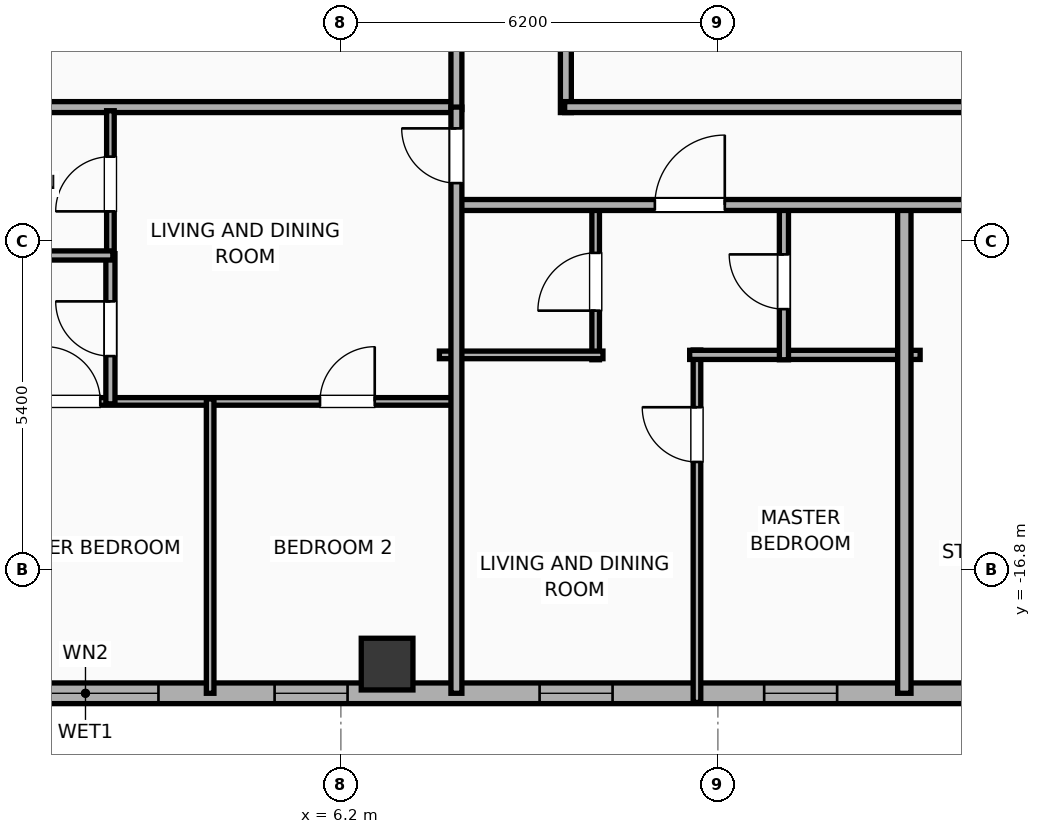
"""IFC4 building model, lengths in metres.
Left out: names, types, materials, properties, quantities, classifications, styles, units other than length and angle.
Written with IfcOpenShell. Run it as: python <this file> out.ifc"""

import sys

from ifc_helpers import new_model, si_unit, direction, frame, frame_2d, origin, origin_2d, place, context, subcontext, project, spatial, rectangle, hollow_rectangle, extrude, element, fill, save


model = new_model("IFC4")
c1 = context("Model", 3, precision=1e-05, world=origin(), true_north=direction((0.0, 1.0)))
c2 = subcontext(c1, "Body", "Model", "MODEL_VIEW")
j1 = project(units=[si_unit("LENGTHUNIT", "METRE"), si_unit("PLANEANGLEUNIT", "RADIAN")], contexts=[c1])
p1 = place(None, origin())
s1 = spatial("IfcSite", under=j1, at=p1, CompositionType="ELEMENT")
p2 = place(p1, origin())
s2 = spatial("IfcBuilding", under=s1, at=p2, CompositionType="ELEMENT")
p3 = place(p2, frame((0.0, 0.0, 219.7)))
s3 = spatial("IfcBuildingStorey", under=s2, at=p3, CompositionType="ELEMENT", Elevation=219.7)
p4 = place(p3, frame((6.96, -18.35, 0.0), z_axis=(0.0, 0.0, 1.0), x_axis=(1.0, 0.0, 0.0)))
e1 = element("IfcColumn", 1, at=p4, inside=s3, PredefinedType="COLUMN", context=c2, shape_type="SweptSolid", body=[
    extrude(hollow_rectangle(XDim=0.85, YDim=0.85, WallThickness=0.028, at=origin_2d()), origin(), (0.0, 0.0, 1.0), 3.9),
])
p5 = place(p3, frame((26.783, -18.83, 0.0), z_axis=(0.0, 0.0, 1.0), x_axis=(-1.0, 0.0, 0.0)))
e2 = element("IfcWall", 2, at=p5, inside=s3, PredefinedType="ELEMENTEDWALL", context=c2, shape_type="SweptSolid", body=[
    extrude(rectangle(XDim=49.566, YDim=0.34, at=frame_2d((24.783, 0.0))), origin(), (0.0, 0.0, 1.0), 3.65),
])
p6 = place(p5, frame((23.583, 0.0, 0.75)))
e3 = element("IfcOpeningElement", 3, at=p6, cuts=e2, PredefinedType="OPENING", context=c2, shape_type="SweptSolid", body=[
    extrude(rectangle(XDim=2.4, YDim=2.1, at=frame_2d((1.2, 1.05))), frame((0.0, 0.18, 0.0), z_axis=(0.0, -1.0, 0.0), x_axis=(1.0, 0.0, 0.0)), (0.0, 0.0, 1.0), 0.36),
])
p7 = place(p5, frame((41.756, 0.0, 0.75)))
e4 = element("IfcOpeningElement", 4, at=p7, cuts=e2, PredefinedType="OPENING", context=c2, shape_type="SweptSolid", body=[
    extrude(rectangle(XDim=2.4, YDim=2.1, at=frame_2d((1.2, 1.05))), frame((0.0, 0.18, 0.0), z_axis=(0.0, -1.0, 0.0), x_axis=(1.0, 0.0, 0.0)), (0.0, 0.0, 1.0), 0.36),
])
p8 = place(p5, frame((47.222, 0.0, 0.75)))
e5 = element("IfcOpeningElement", 5, at=p8, cuts=e2, PredefinedType="OPENING", context=c2, shape_type="SweptSolid", body=[
    extrude(rectangle(XDim=1.2, YDim=2.05, at=frame_2d((0.6, 1.025))), frame((0.0, 0.18, 0.0), z_axis=(0.0, -1.0, 0.0), x_axis=(1.0, 0.0, 0.0)), (0.0, 0.0, 1.0), 0.36),
])
p9 = place(p5, frame((45.08, 0.0, 0.75)))
e6 = element("IfcOpeningElement", 6, at=p9, cuts=e2, PredefinedType="OPENING", context=c2, shape_type="SweptSolid", body=[
    extrude(rectangle(XDim=1.2, YDim=2.05, at=frame_2d((0.6, 1.025))), frame((0.0, 0.18, 0.0), z_axis=(0.0, -1.0, 0.0), x_axis=(1.0, 0.0, 0.0)), (0.0, 0.0, 1.0), 0.36),
])
p10 = place(p5, frame((37.289, 0.0, 0.75)))
e7 = element("IfcOpeningElement", 7, at=p10, cuts=e2, PredefinedType="OPENING", context=c2, shape_type="SweptSolid", body=[
    extrude(rectangle(XDim=1.2, YDim=2.05, at=frame_2d((0.6, 1.025))), frame((0.0, 0.18, 0.0), z_axis=(0.0, -1.0, 0.0), x_axis=(1.0, 0.0, 0.0)), (0.0, 0.0, 1.0), 0.36),
])
p11 = place(p5, frame((16.115, 0.0, 0.75)))
e8 = element("IfcOpeningElement", 8, at=p11, cuts=e2, PredefinedType="OPENING", context=c2, shape_type="SweptSolid", body=[
    extrude(rectangle(XDim=1.2, YDim=2.05, at=frame_2d((0.6, 1.025))), frame((0.0, 0.18, 0.0), z_axis=(0.0, -1.0, 0.0), x_axis=(1.0, 0.0, 0.0)), (0.0, 0.0, 1.0), 0.36),
])
p12 = place(p5, frame((12.422, 0.0, 0.75)))
e9 = element("IfcOpeningElement", 9, at=p12, cuts=e2, PredefinedType="OPENING", context=c2, shape_type="SweptSolid", body=[
    extrude(rectangle(XDim=1.2, YDim=2.05, at=frame_2d((0.6, 1.025))), frame((0.0, 0.18, 0.0), z_axis=(0.0, -1.0, 0.0), x_axis=(1.0, 0.0, 0.0)), (0.0, 0.0, 1.0), 0.36),
])
p13 = place(p5, frame((8.09, 0.0, 0.75)))
e10 = element("IfcOpeningElement", 10, at=p13, cuts=e2, PredefinedType="OPENING", context=c2, shape_type="SweptSolid", body=[
    extrude(rectangle(XDim=1.2, YDim=2.05, at=frame_2d((0.6, 1.025))), frame((0.0, 0.18, 0.0), z_axis=(0.0, -1.0, 0.0), x_axis=(1.0, 0.0, 0.0)), (0.0, 0.0, 1.0), 0.36),
])
p14 = place(p5, frame((4.637, 0.0, 0.75)))
e11 = element("IfcOpeningElement", 11, at=p14, cuts=e2, PredefinedType="OPENING", context=c2, shape_type="SweptSolid", body=[
    extrude(rectangle(XDim=1.2, YDim=2.05, at=frame_2d((0.6, 1.025))), frame((0.0, 0.18, 0.0), z_axis=(0.0, -1.0, 0.0), x_axis=(1.0, 0.0, 0.0)), (0.0, 0.0, 1.0), 0.36),
])
p15 = place(p5, frame((1.811, 0.0, 0.75)))
e12 = element("IfcOpeningElement", 12, at=p15, cuts=e2, PredefinedType="OPENING", context=c2, shape_type="SweptSolid", body=[
    extrude(rectangle(XDim=1.2, YDim=2.05, at=frame_2d((0.6, 1.025))), frame((0.0, 0.18, 0.0), z_axis=(0.0, -1.0, 0.0), x_axis=(1.0, 0.0, 0.0)), (0.0, 0.0, 1.0), 0.36),
])
p16 = place(p5, frame((32.253, 0.0, 0.75)))
e13 = element("IfcOpeningElement", 13, at=p16, cuts=e2, PredefinedType="OPENING", context=c2, shape_type="SweptSolid", body=[
    extrude(rectangle(XDim=1.2, YDim=2.05, at=frame_2d((0.6, 1.025))), frame((0.0, 0.18, 0.0), z_axis=(0.0, -1.0, 0.0), x_axis=(1.0, 0.0, 0.0)), (0.0, 0.0, 1.0), 0.36),
])
p17 = place(p5, frame((27.853, 0.0, 0.75)))
e14 = element("IfcOpeningElement", 14, at=p17, cuts=e2, PredefinedType="OPENING", context=c2, shape_type="SweptSolid", body=[
    extrude(rectangle(XDim=1.2, YDim=2.05, at=frame_2d((0.6, 1.025))), frame((0.0, 0.18, 0.0), z_axis=(0.0, -1.0, 0.0), x_axis=(1.0, 0.0, 0.0)), (0.0, 0.0, 1.0), 0.36),
])
p18 = place(p5, frame((20.473, 0.0, 0.75)))
e15 = element("IfcOpeningElement", 15, at=p18, cuts=e2, PredefinedType="OPENING", context=c2, shape_type="SweptSolid", body=[
    extrude(rectangle(XDim=1.2, YDim=2.05, at=frame_2d((0.6, 1.025))), frame((0.0, 0.18, 0.0), z_axis=(0.0, -1.0, 0.0), x_axis=(1.0, 0.0, 0.0)), (0.0, 0.0, 1.0), 0.36),
])
p19 = place(p3, frame((9.9, -9.28, 0.0), z_axis=(0.0, 0.0, 1.0), x_axis=(0.0, 1.0, 0.0)))
e16 = element("IfcWall", 16, at=p19, inside=s3, PredefinedType="PARTITIONING", context=c2, shape_type="SweptSolid", body=[
    extrude(rectangle(XDim=18.56, YDim=0.18, at=frame_2d((9.28, 0.0))), origin(), (0.0, 0.0, 1.0), 3.65),
])
p20 = place(p19, frame((7.802, 0.0, 0.0)))
e17 = element("IfcOpeningElement", 17, at=p20, cuts=e16, PredefinedType="OPENING", context=c2, shape_type="SweptSolid", body=[
    extrude(rectangle(XDim=1.1, YDim=2.05, at=frame_2d((0.55, 1.025))), frame((0.0, 0.1, 0.0), z_axis=(0.0, -1.0, 0.0), x_axis=(1.0, 0.0, 0.0)), (0.0, 0.0, 1.0), 0.2),
])
p21 = place(p3, frame((9.88, -9.19, 0.0), z_axis=(0.0, 0.0, 1.0), x_axis=(1.0, 0.0, 0.0)))
e18 = element("IfcWall", 18, at=p21, inside=s3, PredefinedType="PARTITIONING", context=c2, shape_type="SweptSolid", body=[
    extrude(rectangle(XDim=20.35, YDim=0.18, at=frame_2d((10.175, 0.0))), origin(), (0.0, 0.0, 1.0), 3.65),
])
p22 = place(p3, frame((-8.15, -9.19, 0.0), z_axis=(0.0, 0.0, 1.0), x_axis=(1.0, 0.0, 0.0)))
e19 = element("IfcWall", 19, at=p22, inside=s3, PredefinedType="PARTITIONING", context=c2, shape_type="SweptSolid", body=[
    extrude(rectangle(XDim=16.3, YDim=0.18, at=frame_2d((8.15, 0.0))), origin(), (0.0, 0.0, 1.0), 3.65),
])
p23 = place(p3, frame((8.1, -9.23, 0.0), z_axis=(0.0, 0.0, 1.0), x_axis=(0.0, 1.0, 0.0)))
e20 = element("IfcWall", 20, at=p23, inside=s3, PredefinedType="PARTITIONING", context=c2, shape_type="SweptSolid", body=[
    extrude(rectangle(XDim=18.46, YDim=0.18, at=frame_2d((9.23, 0.0))), origin(), (0.0, 0.0, 1.0), 3.65),
])
p24 = place(p3, frame((12.056, -18.98, 0.0), z_axis=(0.0, 0.0, 1.0), x_axis=(0.0, 1.0, 0.0)))
e21 = element("IfcWall", 21, at=p24, inside=s3, PredefinedType="PARTITIONING", context=c2, shape_type="SweptSolid", body=[
    extrude(rectangle(XDim=5.795, YDim=0.125, at=frame_2d((2.897, 0.0))), origin(), (0.0, 0.0, 1.0), 3.65),
])
p25 = place(p24, frame((3.954, 0.0, 0.0)))
e22 = element("IfcOpeningElement", 22, at=p25, cuts=e21, PredefinedType="OPENING", context=c2, shape_type="SweptSolid", body=[
    extrude(rectangle(XDim=0.9, YDim=2.05, at=frame_2d((0.45, 1.025))), frame((0.0, 0.073, 0.0), z_axis=(0.0, -1.0, 0.0), x_axis=(1.0, 0.0, 0.0)), (0.0, 0.0, 1.0), 0.145),
])
p26 = place(p3, frame((11.936, -13.265, 0.0), z_axis=(0.0, 0.0, 1.0), x_axis=(1.0, 0.0, 0.0)))
e23 = element("IfcWall", 23, at=p26, inside=s3, PredefinedType="PLUMBINGWALL", context=c2, shape_type="SweptSolid", body=[
    extrude(rectangle(XDim=3.79, YDim=0.15, at=frame_2d((1.895, 0.0))), origin(), (0.0, 0.0, 1.0), 3.65),
])
p27 = place(p3, frame((10.39, -13.345, 0.0), z_axis=(0.0, 0.0, 1.0), x_axis=(0.0, 1.0, 0.0)))
e24 = element("IfcWall", 24, at=p27, inside=s3, PredefinedType="PARTITIONING", context=c2, shape_type="SweptSolid", body=[
    extrude(rectangle(XDim=2.565, YDim=0.125, at=frame_2d((1.282, 0.0))), origin(), (0.0, 0.0, 1.0), 3.65),
])
p28 = place(p27, frame((0.808, 0.0, 0.0)))
e25 = element("IfcOpeningElement", 25, at=p28, cuts=e24, PredefinedType="OPENING", context=c2, shape_type="SweptSolid", body=[
    extrude(rectangle(XDim=0.95, YDim=2.05, at=frame_2d((0.475, 1.025))), frame((0.0, 0.073, 0.0), z_axis=(0.0, -1.0, 0.0), x_axis=(1.0, 0.0, 0.0)), (0.0, 0.0, 1.0), 0.145),
])
p29 = place(p3, frame((7.82, -13.265, 0.0), z_axis=(0.0, 0.0, 1.0), x_axis=(1.0, 0.0, 0.0)))
e26 = element("IfcWall", 26, at=p29, inside=s3, PredefinedType="PARTITIONING", context=c2, shape_type="SweptSolid", body=[
    extrude(rectangle(XDim=2.69, YDim=0.125, at=frame_2d((1.345, 0.0))), origin(), (0.0, 0.0, 1.0), 3.65),
])
p30 = place(p3, frame((13.486, -13.345, 0.0), z_axis=(0.0, 0.0, 1.0), x_axis=(0.0, 1.0, 0.0)))
e27 = element("IfcWall", 27, at=p30, inside=s3, PredefinedType="PLUMBINGWALL", context=c2, shape_type="SweptSolid", body=[
    extrude(rectangle(XDim=2.565, YDim=0.15, at=frame_2d((1.282, 0.0))), origin(), (0.0, 0.0, 1.0), 3.65),
])
p31 = place(p30, frame((0.833, 0.0, 0.0)))
e28 = element("IfcOpeningElement", 28, at=p31, cuts=e27, PredefinedType="OPENING", context=c2, shape_type="SweptSolid", body=[
    extrude(rectangle(XDim=0.9, YDim=2.05, at=frame_2d((0.45, 1.025))), frame((0.0, 0.085, 0.0), z_axis=(0.0, -1.0, 0.0), x_axis=(1.0, 0.0, 0.0)), (0.0, 0.0, 1.0), 0.17),
])
p32 = place(p3, frame((15.466, -18.83, 0.0), z_axis=(0.0, 0.0, 1.0), x_axis=(0.0, 1.0, 0.0)))
e29 = element("IfcWall", 29, at=p32, inside=s3, PredefinedType="PARTITIONING", context=c2, shape_type="SweptSolid", body=[
    extrude(rectangle(XDim=8.11, YDim=0.22, at=frame_2d((4.055, 0.0))), origin(), (0.0, 0.0, 1.0), 3.65),
])
p33 = place(p3, frame((8.08, -10.8, 0.0), z_axis=(0.0, 0.0, 1.0), x_axis=(1.0, 0.0, 0.0)))
e30 = element("IfcWall", 30, at=p33, inside=s3, PredefinedType="PARTITIONING", context=c2, shape_type="SweptSolid", body=[
    extrude(rectangle(XDim=22.15, YDim=0.18, at=frame_2d((11.075, 0.0))), origin(), (0.0, 0.0, 1.0), 3.65),
])
p34 = place(p33, frame((3.283, 0.0, 0.0)))
e31 = element("IfcOpeningElement", 31, at=p34, cuts=e30, PredefinedType="OPENING", context=c2, shape_type="SweptSolid", body=[
    extrude(rectangle(XDim=1.15, YDim=2.05, at=frame_2d((0.575, 1.025))), frame((0.0, 0.1, 0.0), z_axis=(0.0, -1.0, 0.0), x_axis=(1.0, 0.0, 0.0)), (0.0, 0.0, 1.0), 0.2),
])
p35 = place(p33, frame((9.229, 0.0, 0.0)))
e32 = element("IfcOpeningElement", 32, at=p35, cuts=e30, PredefinedType="OPENING", context=c2, shape_type="SweptSolid", body=[
    extrude(rectangle(XDim=1.15, YDim=2.05, at=frame_2d((0.575, 1.025))), frame((0.0, 0.1, 0.0), z_axis=(0.0, -1.0, 0.0), x_axis=(1.0, 0.0, 0.0)), (0.0, 0.0, 1.0), 0.2),
])
p36 = place(p33, frame((18.084, 0.0, 0.0)))
e33 = element("IfcOpeningElement", 33, at=p36, cuts=e30, PredefinedType="OPENING", context=c2, shape_type="SweptSolid", body=[
    extrude(rectangle(XDim=1.15, YDim=2.05, at=frame_2d((0.575, 1.025))), frame((0.0, 0.1, 0.0), z_axis=(0.0, -1.0, 0.0), x_axis=(1.0, 0.0, 0.0)), (0.0, 0.0, 1.0), 0.2),
])
p37 = place(p3, frame((0.02, -14.03, 0.0), z_axis=(0.0, 0.0, 1.0), x_axis=(1.0, 0.0, 0.0)))
e34 = element("IfcWall", 34, at=p37, inside=s3, PredefinedType="PARTITIONING", context=c2, shape_type="SweptSolid", body=[
    extrude(rectangle(XDim=8.06, YDim=0.125, at=frame_2d((4.03, 0.0))), origin(), (0.0, 0.0, 1.0), 3.65),
])
p38 = place(p37, frame((1.323, 0.0, 0.0)))
e35 = element("IfcOpeningElement", 35, at=p38, cuts=e34, PredefinedType="OPENING", context=c2, shape_type="SweptSolid", body=[
    extrude(rectangle(XDim=0.9, YDim=2.05, at=frame_2d((0.45, 1.025))), frame((0.0, 0.073, 0.0), z_axis=(0.0, -1.0, 0.0), x_axis=(1.0, 0.0, 0.0)), (0.0, 0.0, 1.0), 0.145),
])
p39 = place(p37, frame((5.837, 0.0, 0.0)))
e36 = element("IfcOpeningElement", 36, at=p39, cuts=e34, PredefinedType="OPENING", context=c2, shape_type="SweptSolid", body=[
    extrude(rectangle(XDim=0.9, YDim=2.05, at=frame_2d((0.45, 1.025))), frame((0.0, 0.073, 0.0), z_axis=(0.0, -1.0, 0.0), x_axis=(1.0, 0.0, 0.0)), (0.0, 0.0, 1.0), 0.145),
])
p40 = place(p3, frame((2.41, -11.66, 0.0), z_axis=(0.0, 0.0, 1.0), x_axis=(0.0, 1.0, 0.0)))
e37 = element("IfcWall", 37, at=p40, inside=s3, PredefinedType="PARTITIONING", context=c2, shape_type="SweptSolid", body=[
    extrude(rectangle(XDim=2.41, YDim=0.125, at=frame_2d((1.205, 0.0))), origin(), (0.0, 0.0, 1.0), 3.65),
])
p41 = place(p40, frame((0.755, 0.0, 0.0)))
e38 = element("IfcOpeningElement", 38, at=p41, cuts=e37, PredefinedType="OPENING", context=c2, shape_type="SweptSolid", body=[
    extrude(rectangle(XDim=0.9, YDim=2.05, at=frame_2d((0.45, 1.025))), frame((0.0, 0.073, 0.0), z_axis=(0.0, -1.0, 0.0), x_axis=(1.0, 0.0, 0.0)), (0.0, 0.0, 1.0), 0.145),
])
p42 = place(p3, frame((2.41, -14.07, 0.0), z_axis=(0.0, 0.0, 1.0), x_axis=(0.0, 1.0, 0.0)))
e39 = element("IfcWall", 39, at=p42, inside=s3, PredefinedType="PLUMBINGWALL", context=c2, shape_type="SweptSolid", body=[
    extrude(rectangle(XDim=2.47, YDim=0.15, at=frame_2d((1.235, 0.0))), origin(), (0.0, 0.0, 1.0), 3.65),
])
p43 = place(p42, frame((0.785, 0.0, 0.0)))
e40 = element("IfcOpeningElement", 40, at=p43, cuts=e39, PredefinedType="OPENING", context=c2, shape_type="SweptSolid", body=[
    extrude(rectangle(XDim=0.9, YDim=2.05, at=frame_2d((0.45, 1.025))), frame((0.0, 0.085, 0.0), z_axis=(0.0, -1.0, 0.0), x_axis=(1.0, 0.0, 0.0)), (0.0, 0.0, 1.0), 0.17),
])
p44 = place(p3, frame((0.02, -11.63, 0.0), z_axis=(0.0, 0.0, 1.0), x_axis=(1.0, 0.0, 0.0)))
e41 = element("IfcWall", 41, at=p44, inside=s3, PredefinedType="PLUMBINGWALL", context=c2, shape_type="SweptSolid", body=[
    extrude(rectangle(XDim=2.43, YDim=0.15, at=frame_2d((1.215, 0.0))), origin(), (0.0, 0.0, 1.0), 3.65),
])
p45 = place(p3, frame((4.05, -18.83, 0.0), z_axis=(0.0, 0.0, 1.0), x_axis=(0.0, 1.0, 0.0)))
e42 = element("IfcWall", 42, at=p45, inside=s3, PredefinedType="PARTITIONING", context=c2, shape_type="SweptSolid", body=[
    extrude(rectangle(XDim=4.84, YDim=0.125, at=frame_2d((2.42, 0.0))), origin(), (0.0, 0.0, 1.0), 3.65),
])
p46 = place(p3, frame((8.1, -18.83, 0.0), z_axis=(0.0, 0.0, 1.0), x_axis=(0.0, 1.0, 0.0)))
e43 = element("IfcWall", 43, at=p46, inside=s3, PredefinedType="PARTITIONING", context=c2, shape_type="SweptSolid", body=[
    extrude(rectangle(XDim=9.64, YDim=0.18, at=frame_2d((4.82, 0.0))), origin(), (0.0, 0.0, 1.0), 3.65),
])
p47 = place(p46, frame((8.39, 0.0, 0.0)))
e44 = element("IfcOpeningElement", 44, at=p47, cuts=e43, PredefinedType="OPENING", context=c2, shape_type="SweptSolid", body=[
    extrude(rectangle(XDim=0.9, YDim=2.05, at=frame_2d((0.45, 1.025))), frame((0.0, 0.1, 0.0), z_axis=(0.0, -1.0, 0.0), x_axis=(1.0, 0.0, 0.0)), (0.0, 0.0, 1.0), 0.2),
])
p48 = place(p6, origin())
e45 = element("IfcWindow", 45, at=p48, inside=s3, PartitioningType="SINGLE_PANEL", PredefinedType="WINDOW", context=c2, shape_type="SweptSolid", body=[
    extrude(rectangle(XDim=2.4, YDim=2.1, at=frame_2d((1.2, 1.05))), frame((0.0, 0.03, 0.0), z_axis=(0.0, -1.0, 0.0), x_axis=(1.0, 0.0, 0.0)), (0.0, 0.0, 1.0), 0.06),
])
fill(e3, e45)
p49 = place(p11, origin())
e46 = element("IfcWindow", 46, at=p49, inside=s3, PartitioningType="SINGLE_PANEL", PredefinedType="WINDOW", context=c2, shape_type="SweptSolid", body=[
    extrude(rectangle(XDim=1.2, YDim=2.05, at=frame_2d((0.6, 1.025))), frame((0.0, 0.03, 0.0), z_axis=(0.0, -1.0, 0.0), x_axis=(1.0, 0.0, 0.0)), (0.0, 0.0, 1.0), 0.06),
])
fill(e8, e46)
p50 = place(p12, origin())
e47 = element("IfcWindow", 47, at=p50, inside=s3, PartitioningType="SINGLE_PANEL", PredefinedType="WINDOW", context=c2, shape_type="SweptSolid", body=[
    extrude(rectangle(XDim=1.2, YDim=2.05, at=frame_2d((0.6, 1.025))), frame((0.0, 0.03, 0.0), z_axis=(0.0, -1.0, 0.0), x_axis=(1.0, 0.0, 0.0)), (0.0, 0.0, 1.0), 0.06),
])
fill(e9, e47)
p51 = place(p18, origin())
e48 = element("IfcWindow", 48, at=p51, inside=s3, PartitioningType="SINGLE_PANEL", PredefinedType="WINDOW", context=c2, shape_type="SweptSolid", body=[
    extrude(rectangle(XDim=1.2, YDim=2.05, at=frame_2d((0.6, 1.025))), frame((0.0, 0.03, 0.0), z_axis=(0.0, -1.0, 0.0), x_axis=(1.0, 0.0, 0.0)), (0.0, 0.0, 1.0), 0.06),
])
fill(e15, e48)
p52 = place(p25, origin())
e49 = element("IfcDoor", 49, at=p52, inside=s3, OperationType="SINGLE_SWING_RIGHT", PredefinedType="DOOR", context=c2, shape_type="SweptSolid", body=[
    extrude(rectangle(XDim=0.9, YDim=2.05, at=frame_2d((0.45, 1.025))), frame((0.0, 0.025, 0.0), z_axis=(0.0, -1.0, 0.0), x_axis=(1.0, 0.0, 0.0)), (0.0, 0.0, 1.0), 0.05),
])
fill(e22, e49)
p53 = place(p28, origin())
e50 = element("IfcDoor", 50, at=p53, inside=s3, OperationType="SINGLE_SWING_LEFT", PredefinedType="DOOR", context=c2, shape_type="SweptSolid", body=[
    extrude(rectangle(XDim=0.95, YDim=2.05, at=frame_2d((0.475, 1.025))), frame((0.0, 0.025, 0.0), z_axis=(0.0, -1.0, 0.0), x_axis=(1.0, 0.0, 0.0)), (0.0, 0.0, 1.0), 0.05),
])
fill(e25, e50)
p54 = place(p31, origin())
e51 = element("IfcDoor", 51, at=p54, inside=s3, OperationType="SINGLE_SWING_RIGHT", PredefinedType="DOOR", context=c2, shape_type="SweptSolid", body=[
    extrude(rectangle(XDim=0.9, YDim=2.05, at=frame_2d((0.45, 1.025))), frame((0.0, 0.025, 0.0), z_axis=(0.0, -1.0, 0.0), x_axis=(1.0, 0.0, 0.0)), (0.0, 0.0, 1.0), 0.05),
])
fill(e28, e51)
p55 = place(p34, origin())
e52 = element("IfcDoor", 52, at=p55, inside=s3, OperationType="SINGLE_SWING_RIGHT", PredefinedType="DOOR", context=c2, shape_type="SweptSolid", body=[
    extrude(rectangle(XDim=1.15, YDim=2.05, at=frame_2d((0.575, 1.025))), frame((0.0, 0.025, 0.0), z_axis=(0.0, -1.0, 0.0), x_axis=(1.0, 0.0, 0.0)), (0.0, 0.0, 1.0), 0.05),
])
fill(e31, e52)
p56 = place(p38, origin())
e53 = element("IfcDoor", 53, at=p56, inside=s3, OperationType="SINGLE_SWING_LEFT", PredefinedType="DOOR", context=c2, shape_type="SweptSolid", body=[
    extrude(rectangle(XDim=0.9, YDim=2.05, at=frame_2d((0.45, 1.025))), frame((0.0, 0.025, 0.0), z_axis=(0.0, -1.0, 0.0), x_axis=(1.0, 0.0, 0.0)), (0.0, 0.0, 1.0), 0.05),
])
fill(e35, e53)
p57 = place(p39, origin())
e54 = element("IfcDoor", 54, at=p57, inside=s3, OperationType="SINGLE_SWING_RIGHT", PredefinedType="DOOR", context=c2, shape_type="SweptSolid", body=[
    extrude(rectangle(XDim=0.9, YDim=2.05, at=frame_2d((0.45, 1.025))), frame((0.0, 0.025, 0.0), z_axis=(0.0, -1.0, 0.0), x_axis=(1.0, 0.0, 0.0)), (0.0, 0.0, 1.0), 0.05),
])
fill(e36, e54)
p58 = place(p41, origin())
e55 = element("IfcDoor", 55, at=p58, inside=s3, OperationType="SINGLE_SWING_LEFT", PredefinedType="DOOR", context=c2, shape_type="SweptSolid", body=[
    extrude(rectangle(XDim=0.9, YDim=2.05, at=frame_2d((0.45, 1.025))), frame((0.0, 0.025, 0.0), z_axis=(0.0, -1.0, 0.0), x_axis=(1.0, 0.0, 0.0)), (0.0, 0.0, 1.0), 0.05),
])
fill(e38, e55)
p59 = place(p43, origin())
e56 = element("IfcDoor", 56, at=p59, inside=s3, OperationType="SINGLE_SWING_RIGHT", PredefinedType="DOOR", context=c2, shape_type="SweptSolid", body=[
    extrude(rectangle(XDim=0.9, YDim=2.05, at=frame_2d((0.45, 1.025))), frame((0.0, 0.025, 0.0), z_axis=(0.0, -1.0, 0.0), x_axis=(1.0, 0.0, 0.0)), (0.0, 0.0, 1.0), 0.05),
])
fill(e40, e56)
p60 = place(p47, origin())
e57 = element("IfcDoor", 57, at=p60, inside=s3, OperationType="SINGLE_SWING_RIGHT", PredefinedType="DOOR", context=c2, shape_type="SweptSolid", body=[
    extrude(rectangle(XDim=0.9, YDim=2.05, at=frame_2d((0.45, 1.025))), frame((0.0, 0.025, 0.0), z_axis=(0.0, -1.0, 0.0), x_axis=(1.0, 0.0, 0.0)), (0.0, 0.0, 1.0), 0.05),
])
fill(e44, e57)
save(model, sys.argv[1])
